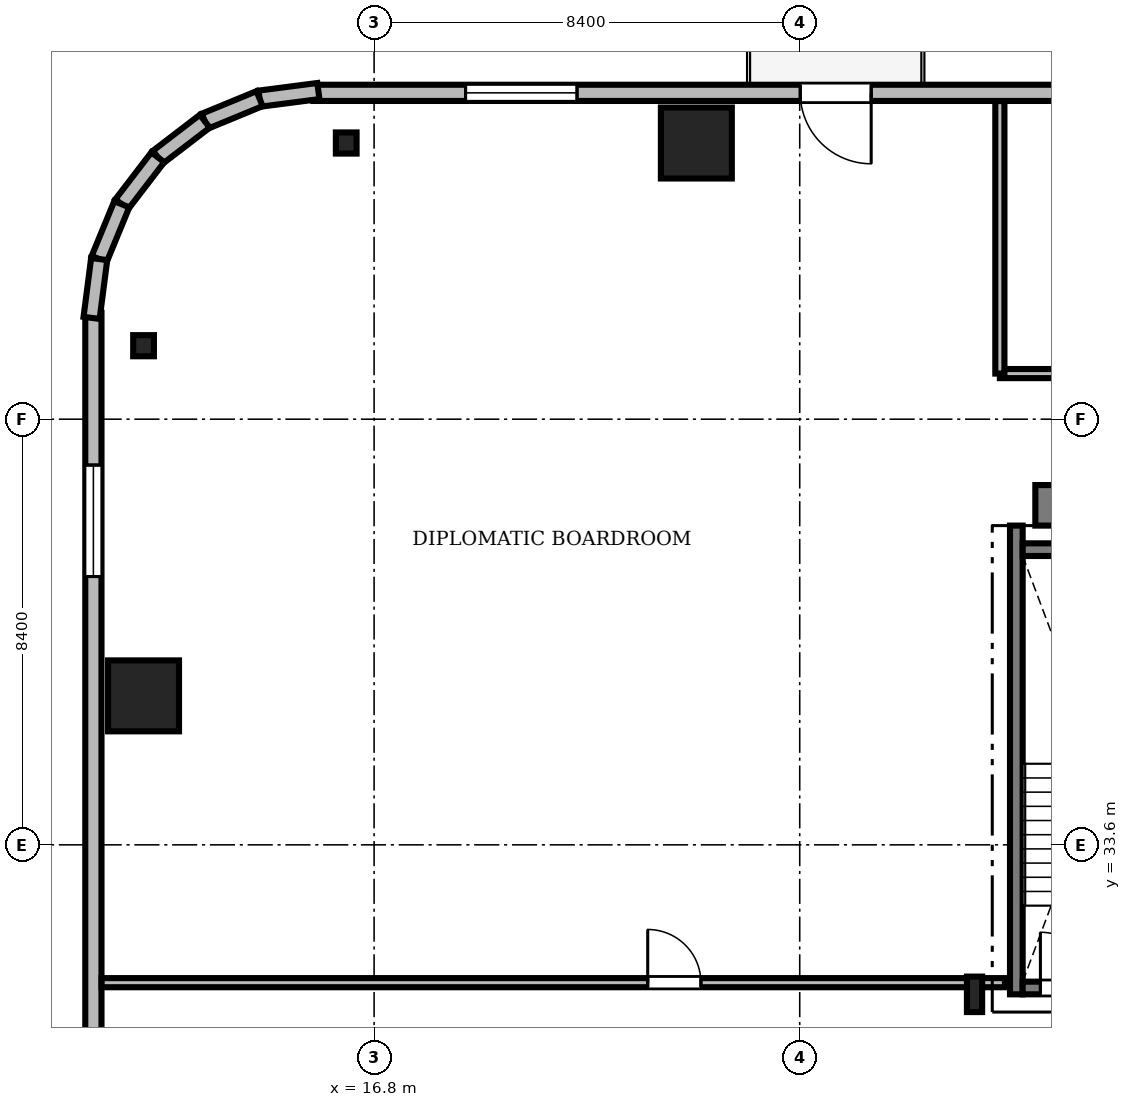
"""IFC4 building model, lengths in metres.
Left out: names, types, materials, properties, quantities, classifications, styles, units other than length and angle.
Written with IfcOpenShell. Run it as: python <this file> out.ifc"""

import sys

from ifc_helpers import new_model, si_unit, direction, frame, frame_2d, origin, origin_2d, place, context, subcontext, project, spatial, rectangle, i_section, extrude, source, transform, mapped, element, fill, save


model = new_model("IFC4")
c1 = context("Model", 3, precision=1e-05, world=origin(), true_north=direction((0.0, 1.0)))
c2 = subcontext(c1, "Body", "Model", "MODEL_VIEW")
j1 = project(units=[si_unit("LENGTHUNIT", "METRE"), si_unit("PLANEANGLEUNIT", "RADIAN")], contexts=[c1])
p1 = place(None, origin())
s1 = spatial("IfcSite", under=j1, at=p1, CompositionType="ELEMENT")
p2 = place(p1, origin())
s2 = spatial("IfcBuilding", under=s1, at=p2, CompositionType="ELEMENT")
p3 = place(p2, frame((0.0, 0.0, 222.3)))
s3 = spatial("IfcBuildingStorey", under=s2, at=p3, CompositionType="ELEMENT", Elevation=222.3)
m1 = source(origin(), c2, "Body", "SweptSolid", [
    extrude(rectangle(XDim=17.52, YDim=0.8, at=frame_2d((8.76, 0.0))), origin(), (0.0, 0.0, 1.0), 3.53),
])
p4 = place(p3, frame((29.85, 40.3, 0.0), z_axis=(0.0, 0.0, 1.0), x_axis=(1.0, 0.0, 0.0)))
e1 = element("IfcWall", 1, at=p4, inside=s3, PredefinedType="SHEAR", context=c2, shape_type="MappedRepresentation", body=[
    mapped(m1, transform((0.0, 0.0, 0.0), scale=1.0)),
])
m2 = source(origin(), c2, "Body", "SweptSolid", [
    extrude(i_section(OverallWidth=0.3, OverallDepth=0.7, WebThickness=0.017, FlangeThickness=0.032, FilletRadius=0.027, at=origin_2d()), origin(), (0.0, 0.0, 1.0), 3.53),
])
p5 = place(p3, frame((28.65, 30.65, 0.0), z_axis=(0.0, 0.0, 1.0), x_axis=(1.0, 0.0, 0.0)))
e2 = element("IfcColumn", 2, at=p5, inside=s3, PredefinedType="COLUMN", context=c2, shape_type="MappedRepresentation", body=[
    mapped(m2, transform((0.0, 0.0, 0.0), scale=1.0)),
])
m3 = source(origin(), c2, "Body", "SweptSolid", [
    extrude(rectangle(XDim=1.4, YDim=1.4, at=origin_2d()), origin(), (0.0, 0.0, 1.0), 3.53),
])
for number, where, z_axis, x_axis in (
    (3, (23.16, 47.45, 0.0), (0.0, 0.0, 1.0), (1.0, 0.0, 0.0)),
    (4, (12.25, 36.54, 0.0), (0.0, 0.0, 1.0), (1.0, 0.0, 0.0)),
):
    element("IfcColumn", number, at=place(p3, frame(where, z_axis=z_axis, x_axis=x_axis)), inside=s3, PredefinedType="COLUMN", context=c2, shape_type="MappedRepresentation", body=[
        mapped(m3, transform((0.0, 0.0, 0.0), scale=1.0)),
    ])
m4 = source(origin(), c2, "Body", "SweptSolid", [
    extrude(i_section(OverallWidth=0.409, OverallDepth=0.417, WebThickness=0.021, FlangeThickness=0.033, FilletRadius=0.015, at=origin_2d()), origin(), (0.0, 0.0, 1.0), 3.53),
])
for number, where, z_axis, x_axis in (
    (5, (16.25, 47.45, 0.0), (0.0, 0.0, 1.0), (1.0, 0.0, 0.0)),
    (6, (12.25, 43.45, 0.0), (0.0, 0.0, 1.0), (1.0, 0.0, 0.0)),
):
    element("IfcColumn", number, at=place(p3, frame(where, z_axis=z_axis, x_axis=x_axis)), inside=s3, PredefinedType="COLUMN", context=c2, shape_type="MappedRepresentation", body=[
        mapped(m4, transform((0.0, 0.0, 0.0), scale=1.0)),
    ])
m5 = source(origin(), c2, "Body", "SweptSolid", [
    extrude(rectangle(XDim=15.6, YDim=0.32, at=frame_2d((7.8, 0.0))), origin(), (0.0, 0.0, 1.0), 3.53),
])
p6 = place(p3, frame((31.2, 48.44, 0.0), z_axis=(0.0, 0.0, 1.0), x_axis=(-1.0, 0.0, 0.0)))
e7 = element("IfcWall", 7, at=p6, inside=s3, PredefinedType="SOLIDWALL", context=c2, shape_type="MappedRepresentation", body=[
    mapped(m5, transform((0.0, 0.0, 0.0), scale=1.0)),
])
m6 = source(origin(), c2, "Body", "SweptSolid", [
    extrude(rectangle(XDim=1.4, YDim=2.3, at=frame_2d((0.7, 1.15))), frame((0.0, 0.17, 0.0), z_axis=(0.0, -1.0, 0.0), x_axis=(1.0, 0.0, 0.0)), (0.0, 0.0, 1.0), 0.34),
])
p7 = place(p6, frame((4.59, 0.0, 0.0)))
e8 = element("IfcOpeningElement", 8, at=p7, cuts=e7, PredefinedType="OPENING", context=c2, shape_type="MappedRepresentation", body=[
    mapped(m6, transform((0.0, 0.0, 0.0), scale=1.0)),
])
m7 = source(origin(), c2, "Body", "SweptSolid", [
    extrude(rectangle(XDim=2.2, YDim=2.4, at=frame_2d((1.1, 1.2))), frame((0.0, 0.17, 0.0), z_axis=(0.0, -1.0, 0.0), x_axis=(1.0, 0.0, 0.0)), (0.0, 0.0, 1.0), 0.34),
])
p8 = place(p6, frame((10.395, 0.0, 0.72)))
e9 = element("IfcOpeningElement", 9, at=p8, cuts=e7, PredefinedType="OPENING", context=c2, shape_type="MappedRepresentation", body=[
    mapped(m7, transform((0.0, 0.0, 0.0), scale=1.0)),
])
m8 = source(origin(), c2, "Body", "SweptSolid", [
    extrude(rectangle(XDim=15.6, YDim=0.32, at=frame_2d((7.8, 0.0))), origin(), (0.0, 0.0, 1.0), 3.53),
])
p9 = place(p3, frame((11.26, 44.1, 0.0), z_axis=(0.0, 0.0, 1.0), x_axis=(0.0, -1.0, 0.0)))
e10 = element("IfcWall", 10, at=p9, inside=s3, PredefinedType="SOLIDWALL", context=c2, shape_type="MappedRepresentation", body=[
    mapped(m8, transform((0.0, 0.0, 0.0), scale=1.0)),
])
p10 = place(p9, frame((3.005, 0.0, 0.72)))
e11 = element("IfcOpeningElement", 11, at=p10, cuts=e10, PredefinedType="OPENING", context=c2, shape_type="MappedRepresentation", body=[
    mapped(m7, transform((0.0, 0.0, 0.0), scale=1.0)),
])
m9 = source(origin(), c2, "Body", "SweptSolid", [
    extrude(rectangle(XDim=1.17, YDim=0.32, at=frame_2d((0.585, 0.0))), origin(), (0.0, 0.0, 1.0), 3.53),
])
p11 = place(p3, frame((15.7, 48.476, 0.0), z_axis=(0.0, 0.0, 1.0), x_axis=(-0.991735963317, -0.128295670475, 0.0)))
e12 = element("IfcWall", 12, at=p11, inside=s3, PredefinedType="SOLIDWALL", context=c2, shape_type="MappedRepresentation", body=[
    mapped(m9, transform((0.0, 0.0, 0.0), scale=1.0)),
])
m10 = source(origin(), c2, "Body", "SweptSolid", [
    extrude(rectangle(XDim=1.169, YDim=0.32, at=frame_2d((0.584, 0.0))), origin(), (0.0, 0.0, 1.0), 3.53),
])
p12 = place(p3, frame((14.54, 48.325, 0.0), z_axis=(0.0, 0.0, 1.0), x_axis=(-0.924552646638, -0.381054331552, 0.0)))
e13 = element("IfcWall", 13, at=p12, inside=s3, PredefinedType="SOLIDWALL", context=c2, shape_type="MappedRepresentation", body=[
    mapped(m10, transform((0.0, 0.0, 0.0), scale=1.0)),
])
m11 = source(origin(), c2, "Body", "SweptSolid", [
    extrude(rectangle(XDim=1.169, YDim=0.32, at=frame_2d((0.584, 0.0))), origin(), (0.0, 0.0, 1.0), 3.53),
])
p13 = place(p3, frame((13.459, 47.88, 0.0), z_axis=(0.0, 0.0, 1.0), x_axis=(-0.793663520347, -0.608356981114, 0.0)))
e14 = element("IfcWall", 14, at=p13, inside=s3, PredefinedType="SOLIDWALL", context=c2, shape_type="MappedRepresentation", body=[
    mapped(m11, transform((0.0, 0.0, 0.0), scale=1.0)),
])
m12 = source(origin(), c2, "Body", "SweptSolid", [
    extrude(rectangle(XDim=1.169, YDim=0.32, at=frame_2d((0.584, 0.0))), origin(), (0.0, 0.0, 1.0), 3.53),
])
p14 = place(p3, frame((12.531, 47.169, 0.0), z_axis=(0.0, 0.0, 1.0), x_axis=(-0.608387696831, -0.793639975269, 0.0)))
e15 = element("IfcWall", 15, at=p14, inside=s3, PredefinedType="SOLIDWALL", context=c2, shape_type="MappedRepresentation", body=[
    mapped(m12, transform((0.0, 0.0, 0.0), scale=1.0)),
])
p15 = place(p3, frame((11.82, 46.241, 0.0), z_axis=(0.0, 0.0, 1.0), x_axis=(-0.381054331552, -0.924552646638, 0.0)))
e16 = element("IfcWall", 16, at=p15, inside=s3, PredefinedType="SOLIDWALL", context=c2, shape_type="MappedRepresentation", body=[
    mapped(m10, transform((0.0, 0.0, 0.0), scale=1.0)),
])
p16 = place(p3, frame((11.375, 45.16, 0.0), z_axis=(0.0, 0.0, 1.0), x_axis=(-0.128295670475, -0.991735963317, 0.0)))
e17 = element("IfcWall", 17, at=p16, inside=s3, PredefinedType="SOLIDWALL", context=c2, shape_type="MappedRepresentation", body=[
    mapped(m9, transform((0.0, 0.0, 0.0), scale=1.0)),
])
m13 = source(origin(), c2, "Body", "SweptSolid", [
    extrude(rectangle(XDim=9.25, YDim=0.25, at=frame_2d((4.625, 0.0))), origin(), (0.0, 0.0, 1.0), 3.55),
])
p17 = place(p3, frame((29.475, 30.65, 0.0), z_axis=(0.0, 0.0, 1.0), x_axis=(0.0, 1.0, 0.0)))
e18 = element("IfcWall", 18, at=p17, inside=s3, PredefinedType="SOLIDWALL", context=c2, shape_type="MappedRepresentation", body=[
    mapped(m13, transform((0.0, 0.0, 0.0), scale=1.0)),
])
m14 = source(origin(), c2, "Body", "SweptSolid", [
    extrude(rectangle(XDim=3.15, YDim=0.25, at=frame_2d((1.575, 0.0))), origin(), (0.0, 0.0, 1.0), 3.55),
])
p18 = place(p3, frame((29.6, 39.425, 0.0), z_axis=(0.0, 0.0, 1.0), x_axis=(1.0, 0.0, 0.0)))
e19 = element("IfcWall", 19, at=p18, inside=s3, PredefinedType="SOLIDWALL", context=c2, shape_type="MappedRepresentation", body=[
    mapped(m14, transform((0.0, 0.0, 0.0), scale=1.0)),
])
p19 = place(p3, frame((29.6, 30.775, 0.0), z_axis=(0.0, 0.0, 1.0), x_axis=(1.0, 0.0, 0.0)))
e20 = element("IfcWall", 20, at=p19, inside=s3, PredefinedType="SOLIDWALL", context=c2, shape_type="MappedRepresentation", body=[
    mapped(m14, transform((0.0, 0.0, 0.0), scale=1.0)),
])
m15 = source(origin(), c2, "Body", "SweptSolid", [
    extrude(rectangle(XDim=1.1, YDim=2.2, at=frame_2d((0.55, 1.1))), frame((0.0, 0.135, 0.0), z_axis=(0.0, -1.0, 0.0), x_axis=(1.0, 0.0, 0.0)), (0.0, 0.0, 1.0), 0.27),
])
p20 = place(p19, frame((0.35, 0.0, 0.0)))
e21 = element("IfcOpeningElement", 21, at=p20, cuts=e20, PredefinedType="OPENING", context=c2, shape_type="MappedRepresentation", body=[
    mapped(m15, transform((0.0, 0.0, 0.0), scale=1.0)),
])
m16 = source(origin(), c2, "Body", "SweptSolid", [
    extrude(rectangle(XDim=28.428, YDim=0.18, at=frame_2d((14.214, 0.0))), origin(), (0.0, 0.0, 1.0), 2.772),
])
p21 = place(p3, frame((29.15, 42.9, 0.0), z_axis=(0.0, 0.0, 1.0), x_axis=(1.0, 0.0, 0.0)))
e22 = element("IfcWall", 22, at=p21, inside=s3, PredefinedType="PARTITIONING", context=c2, shape_type="MappedRepresentation", body=[
    mapped(m16, transform((0.0, 0.0, 0.0), scale=1.0)),
])
m17 = source(origin(), c2, "Body", "SweptSolid", [
    extrude(rectangle(XDim=1.05, YDim=2.2, at=frame_2d((0.525, 1.1))), frame((0.0, 0.1, 0.0), z_axis=(0.0, -1.0, 0.0), x_axis=(1.0, 0.0, 0.0)), (0.0, 0.0, 1.0), 0.2),
])
p22 = place(p21, frame((4.5, 0.0, 0.0)))
e23 = element("IfcOpeningElement", 23, at=p22, cuts=e22, PredefinedType="OPENING", context=c2, shape_type="MappedRepresentation", body=[
    mapped(m17, transform((0.0, 0.0, 0.0), scale=1.0)),
])
m18 = source(origin(), c2, "Body", "SweptSolid", [
    extrude(rectangle(XDim=17.828, YDim=0.18, at=frame_2d((8.914, 0.0))), origin(), (0.0, 0.0, 1.0), 2.772),
])
p23 = place(p3, frame((11.422, 30.88, 0.0), z_axis=(0.0, 0.0, 1.0), x_axis=(1.0, 0.0, 0.0)))
e24 = element("IfcWall", 24, at=p23, inside=s3, PredefinedType="PARTITIONING", context=c2, shape_type="MappedRepresentation", body=[
    mapped(m18, transform((0.0, 0.0, 0.0), scale=1.0)),
])
p24 = place(p23, frame((10.778, 0.0, 0.0)))
e25 = element("IfcOpeningElement", 25, at=p24, cuts=e24, PredefinedType="OPENING", context=c2, shape_type="MappedRepresentation", body=[
    mapped(m17, transform((0.0, 0.0, 0.0), scale=1.0)),
])
m19 = source(origin(), c2, "Body", "SweptSolid", [
    extrude(rectangle(XDim=5.378, YDim=0.18, at=frame_2d((2.689, 0.0))), origin(), (0.0, 0.0, 1.0), 2.772),
])
p25 = place(p3, frame((29.15, 42.9, 0.0), z_axis=(0.0, 0.0, 1.0), x_axis=(0.0, 1.0, 0.0)))
e26 = element("IfcWall", 26, at=p25, inside=s3, PredefinedType="PARTITIONING", context=c2, shape_type="MappedRepresentation", body=[
    mapped(m19, transform((0.0, 0.0, 0.0), scale=1.0)),
])
m20 = source(origin(), c2, "Body", "SweptSolid", [
    extrude(rectangle(XDim=1.4, YDim=2.3, at=frame_2d((0.7, 1.15))), frame((0.0, 0.025, 0.0), z_axis=(0.0, -1.0, 0.0), x_axis=(1.0, 0.0, 0.0)), (0.0, 0.0, 1.0), 0.05),
])
p26 = place(p7, frame((1.4, 0.0, 0.0), z_axis=(0.0, 0.0, 1.0), x_axis=(-1.0, 0.0, 0.0)))
e27 = element("IfcDoor", 27, at=p26, inside=s3, OperationType="DOUBLE_DOOR_SLIDING", PredefinedType="DOOR", context=c2, shape_type="MappedRepresentation", body=[
    mapped(m20, transform((0.0, 0.0, 0.0), scale=1.0)),
])
fill(e8, e27)
m21 = source(origin(), c2, "Body", "SweptSolid", [
    extrude(rectangle(XDim=2.2, YDim=2.4, at=frame_2d((1.1, 1.2))), frame((0.0, 0.03, 0.0), z_axis=(0.0, -1.0, 0.0), x_axis=(1.0, 0.0, 0.0)), (0.0, 0.0, 1.0), 0.06),
])
p27 = place(p8, origin())
e28 = element("IfcWindow", 28, at=p27, inside=s3, PartitioningType="SINGLE_PANEL", PredefinedType="WINDOW", context=c2, shape_type="MappedRepresentation", body=[
    mapped(m21, transform((0.0, 0.0, 0.0), scale=1.0)),
])
fill(e9, e28)
p28 = place(p10, origin())
e29 = element("IfcWindow", 29, at=p28, inside=s3, PartitioningType="SINGLE_PANEL", PredefinedType="WINDOW", context=c2, shape_type="MappedRepresentation", body=[
    mapped(m21, transform((0.0, 0.0, 0.0), scale=1.0)),
])
fill(e11, e29)
m22 = source(origin(), c2, "Body", "SweptSolid", [
    extrude(rectangle(XDim=1.1, YDim=2.2, at=frame_2d((0.55, 1.1))), frame((0.0, 0.025, 0.0), z_axis=(0.0, -1.0, 0.0), x_axis=(1.0, 0.0, 0.0)), (0.0, 0.0, 1.0), 0.05),
])
p29 = place(p20, origin())
e30 = element("IfcDoor", 30, at=p29, inside=s3, OperationType="SINGLE_SWING_LEFT", PredefinedType="DOOR", context=c2, shape_type="MappedRepresentation", body=[
    mapped(m22, transform((0.0, 0.0, 0.0), scale=1.0)),
])
fill(e21, e30)
m23 = source(origin(), c2, "Body", "SweptSolid", [
    extrude(rectangle(XDim=1.05, YDim=2.2, at=frame_2d((0.525, 1.1))), frame((0.0, 0.025, 0.0), z_axis=(0.0, -1.0, 0.0), x_axis=(1.0, 0.0, 0.0)), (0.0, 0.0, 1.0), 0.05),
])
p30 = place(p24, origin())
e31 = element("IfcDoor", 31, at=p30, inside=s3, OperationType="SINGLE_SWING_LEFT", PredefinedType="DOOR", context=c2, shape_type="MappedRepresentation", body=[
    mapped(m23, transform((0.0, 0.0, 0.0), scale=1.0)),
])
fill(e25, e31)
save(model, sys.argv[1])
